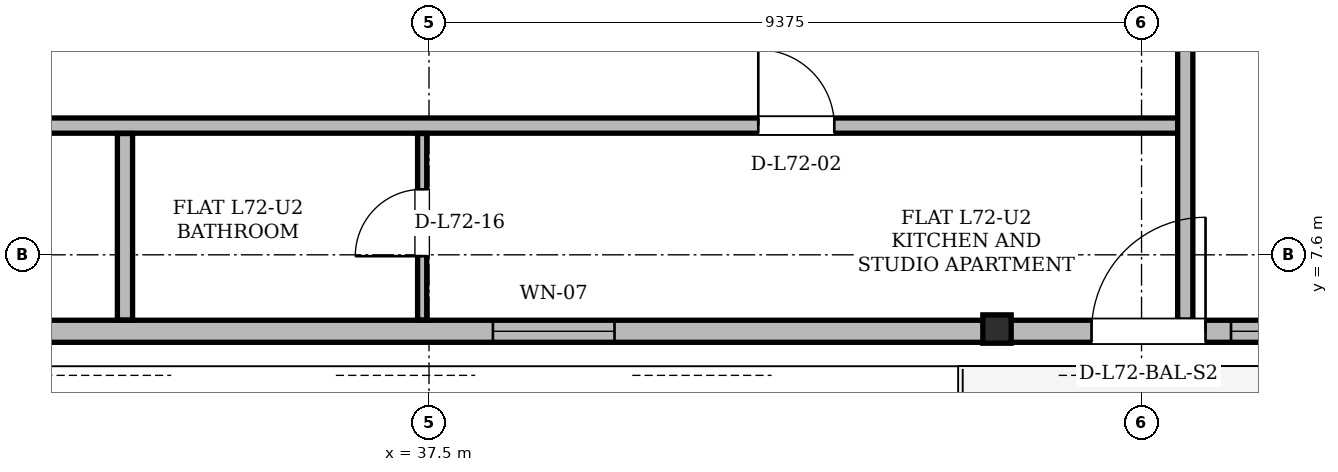
"""IFC4 building model, lengths in metres.
Left out: names, types, materials, properties, quantities, classifications, styles, units other than length and angle.
Written with IfcOpenShell. Run it as: python <this file> out.ifc"""

import sys

from ifc_helpers import new_model, si_unit, direction, frame, frame_2d, origin, origin_2d, place, context, subcontext, project, spatial, rectangle, i_section, extrude, element, fill, save


model = new_model("IFC4")
c1 = context("Model", 3, precision=1e-05, world=origin(), true_north=direction((0.0, 1.0)))
c2 = subcontext(c1, "Body", "Model", "MODEL_VIEW")
j1 = project(units=[si_unit("LENGTHUNIT", "METRE"), si_unit("PLANEANGLEUNIT", "RADIAN")], contexts=[c1])
p1 = place(None, origin())
s1 = spatial("IfcSite", under=j1, at=p1, CompositionType="ELEMENT")
p2 = place(p1, origin())
s2 = spatial("IfcBuilding", under=s1, at=p2, CompositionType="ELEMENT")
p3 = place(p2, frame((0.0, 0.0, 273.3)))
s3 = spatial("IfcBuildingStorey", under=s2, at=p3, CompositionType="ELEMENT", Elevation=273.3)
p4 = place(p3, frame((44.969, 6.594, 0.004), z_axis=(0.002383957357, 0.015182044222, 0.999881904167), x_axis=(-0.987895005451, 0.15512400912, 0.0)))
e1 = element("IfcColumn", 1, at=p4, inside=s3, PredefinedType="COLUMN", context=c2, shape_type="SweptSolid", body=[
    extrude(i_section(OverallWidth=0.373, OverallDepth=0.373, WebThickness=0.016, FlangeThickness=0.026, at=origin_2d()), origin(), (0.0, 0.0, 1.0), 3.892),
])
p5 = place(p3, frame((18.829, 6.594, 0.0), z_axis=(0.0, 0.0, 1.0), x_axis=(1.0, 0.0, 0.0)))
e2 = element("IfcWall", 2, at=p5, inside=s3, PredefinedType="SOLIDWALL", context=c2, shape_type="SweptSolid", body=[
    extrude(rectangle(XDim=37.343, YDim=0.29, at=frame_2d((18.671, 0.0))), origin(), (0.0, 0.0, 1.0), 3.058),
])
p6 = place(p5, frame((3.639, 0.0, 0.0)))
e3 = element("IfcOpeningElement", 3, at=p6, cuts=e2, PredefinedType="OPENING", context=c2, shape_type="SweptSolid", body=[
    extrude(rectangle(XDim=1.5, YDim=2.2, at=frame_2d((0.75, 1.1))), frame((0.0, 0.145, 0.0), z_axis=(0.0, -1.0, 0.0), x_axis=(1.0, 0.0, 0.0)), (0.0, 0.0, 1.0), 0.29),
])
p7 = place(p5, frame((27.388, 0.0, 0.0)))
e4 = element("IfcOpeningElement", 4, at=p7, cuts=e2, PredefinedType="OPENING", context=c2, shape_type="SweptSolid", body=[
    extrude(rectangle(XDim=1.5, YDim=2.2, at=frame_2d((0.75, 1.1))), frame((0.0, 0.145, 0.0), z_axis=(0.0, -1.0, 0.0), x_axis=(1.0, 0.0, 0.0)), (0.0, 0.0, 1.0), 0.29),
])
p8 = place(p5, frame((11.813, 0.0, 0.85)))
e5 = element("IfcOpeningElement", 5, at=p8, cuts=e2, PredefinedType="OPENING", context=c2, shape_type="SweptSolid", body=[
    extrude(rectangle(XDim=1.2, YDim=1.48, at=frame_2d((0.6, 0.74))), frame((0.0, 0.145, 0.0), z_axis=(0.0, -1.0, 0.0), x_axis=(1.0, 0.0, 0.0)), (0.0, 0.0, 1.0), 0.29),
])
p9 = place(p5, frame((0.897, 0.0, 0.85)))
e6 = element("IfcOpeningElement", 6, at=p9, cuts=e2, PredefinedType="OPENING", context=c2, shape_type="SweptSolid", body=[
    extrude(rectangle(XDim=1.2, YDim=1.48, at=frame_2d((0.6, 0.74))), frame((0.0, 0.145, 0.0), z_axis=(0.0, -1.0, 0.0), x_axis=(1.0, 0.0, 0.0)), (0.0, 0.0, 1.0), 0.29),
])
p10 = place(p5, frame((19.512, 0.0, 0.85)))
e7 = element("IfcOpeningElement", 7, at=p10, cuts=e2, PredefinedType="OPENING", context=c2, shape_type="SweptSolid", body=[
    extrude(rectangle(XDim=1.6, YDim=1.7, at=frame_2d((0.8, 0.85))), frame((0.0, 0.145, 0.0), z_axis=(0.0, -1.0, 0.0), x_axis=(1.0, 0.0, 0.0)), (0.0, 0.0, 1.0), 0.29),
])
p11 = place(p5, frame((29.224, 0.0, 0.85)))
e8 = element("IfcOpeningElement", 8, at=p11, cuts=e2, PredefinedType="OPENING", context=c2, shape_type="SweptSolid", body=[
    extrude(rectangle(XDim=1.2, YDim=1.48, at=frame_2d((0.6, 0.74))), frame((0.0, 0.145, 0.0), z_axis=(0.0, -1.0, 0.0), x_axis=(1.0, 0.0, 0.0)), (0.0, 0.0, 1.0), 0.29),
])
p12 = place(p5, frame((32.478, 0.0, 0.85)))
e9 = element("IfcOpeningElement", 9, at=p12, cuts=e2, PredefinedType="OPENING", context=c2, shape_type="SweptSolid", body=[
    extrude(rectangle(XDim=1.8, YDim=1.75, at=frame_2d((0.9, 0.875))), frame((0.0, 0.145, 0.0), z_axis=(0.0, -1.0, 0.0), x_axis=(1.0, 0.0, 0.0)), (0.0, 0.0, 1.0), 0.29),
])
p13 = place(p5, frame((35.23, 0.0, 0.85)))
e10 = element("IfcOpeningElement", 10, at=p13, cuts=e2, PredefinedType="OPENING", context=c2, shape_type="SweptSolid", body=[
    extrude(rectangle(XDim=1.2, YDim=1.48, at=frame_2d((0.6, 0.74))), frame((0.0, 0.145, 0.0), z_axis=(0.0, -1.0, 0.0), x_axis=(1.0, 0.0, 0.0)), (0.0, 0.0, 1.0), 0.29),
])
p14 = place(p3, frame((25.6, 9.3, 0.0), z_axis=(0.0, 0.0, 1.0), x_axis=(1.0, 0.0, 0.0)))
e11 = element("IfcWall", 11, at=p14, inside=s3, PredefinedType="PARTITIONING", context=c2, shape_type="SweptSolid", body=[
    extrude(rectangle(XDim=21.85, YDim=0.2, at=frame_2d((10.925, 0.0))), origin(), (0.0, 0.0, 1.0), 3.68),
])
p15 = place(p14, frame((3.841, 0.0, 0.0)))
e12 = element("IfcOpeningElement", 12, at=p15, cuts=e11, PredefinedType="OPENING", context=c2, shape_type="SweptSolid", body=[
    extrude(rectangle(XDim=1.0, YDim=2.18, at=frame_2d((0.5, 1.09))), frame((0.0, 0.1, 0.0), z_axis=(0.0, -1.0, 0.0), x_axis=(1.0, 0.0, 0.0)), (0.0, 0.0, 1.0), 0.2),
])
p16 = place(p14, frame((16.232, 0.0, 0.0)))
e13 = element("IfcOpeningElement", 13, at=p16, cuts=e11, PredefinedType="OPENING", context=c2, shape_type="SweptSolid", body=[
    extrude(rectangle(XDim=1.0, YDim=2.18, at=frame_2d((0.5, 1.09))), frame((0.0, 0.1, 0.0), z_axis=(0.0, -1.0, 0.0), x_axis=(1.0, 0.0, 0.0)), (0.0, 0.0, 1.0), 0.2),
])
p17 = place(p3, frame((33.5, 6.743, 0.0), z_axis=(0.0, 0.0, 1.0), x_axis=(0.0, 1.0, 0.0)))
e14 = element("IfcWall", 14, at=p17, inside=s3, PredefinedType="PARTITIONING", context=c2, shape_type="SweptSolid", body=[
    extrude(rectangle(XDim=2.453, YDim=0.2, at=frame_2d((1.227, 0.0))), origin(), (0.0, 0.0, 1.0), 3.68),
])
p18 = place(p3, frame((37.41, 6.743, 0.0), z_axis=(0.0, 0.0, 1.0), x_axis=(0.0, 1.0, 0.0)))
e15 = element("IfcWall", 15, at=p18, inside=s3, PredefinedType="PARTITIONING", context=c2, shape_type="SweptSolid", body=[
    extrude(rectangle(XDim=2.453, YDim=0.12, at=frame_2d((1.227, 0.0))), origin(), (0.0, 0.0, 1.0), 3.68),
])
p19 = place(p18, frame((0.839, 0.0, 0.0)))
e16 = element("IfcOpeningElement", 16, at=p19, cuts=e15, PredefinedType="OPENING", context=c2, shape_type="SweptSolid", body=[
    extrude(rectangle(XDim=0.88, YDim=2.08, at=frame_2d((0.44, 1.04))), frame((0.0, 0.06, 0.0), z_axis=(0.0, -1.0, 0.0), x_axis=(1.0, 0.0, 0.0)), (0.0, 0.0, 1.0), 0.12),
])
p20 = place(p3, frame((47.45, 6.743, 0.0), z_axis=(0.0, 0.0, 1.0), x_axis=(0.0, 1.0, 0.0)))
e17 = element("IfcWall", 17, at=p20, inside=s3, PredefinedType="PARTITIONING", context=c2, shape_type="SweptSolid", body=[
    extrude(rectangle(XDim=22.837, YDim=0.2, at=frame_2d((11.418, 0.0))), origin(), (0.0, 0.0, 1.0), 3.058),
])
p21 = place(p20, frame((7.153, 0.0, 0.0)))
e18 = element("IfcOpeningElement", 18, at=p21, cuts=e17, PredefinedType="OPENING", context=c2, shape_type="SweptSolid", body=[
    extrude(rectangle(XDim=1.0, YDim=2.18, at=frame_2d((0.5, 1.09))), frame((0.0, 0.1, 0.0), z_axis=(0.0, -1.0, 0.0), x_axis=(1.0, 0.0, 0.0)), (0.0, 0.0, 1.0), 0.2),
])
p22 = place(p20, frame((15.139, 0.0, 0.0)))
e19 = element("IfcOpeningElement", 19, at=p22, cuts=e17, PredefinedType="OPENING", context=c2, shape_type="SweptSolid", body=[
    extrude(rectangle(XDim=1.0, YDim=2.18, at=frame_2d((0.5, 1.09))), frame((0.0, 0.1, 0.0), z_axis=(0.0, -1.0, 0.0), x_axis=(1.0, 0.0, 0.0)), (0.0, 0.0, 1.0), 0.2),
])
p23 = place(p7, origin())
e20 = element("IfcDoor", 20, at=p23, inside=s3, OperationType="SINGLE_SWING_RIGHT", PredefinedType="DOOR", context=c2, shape_type="SweptSolid", body=[
    extrude(rectangle(XDim=1.5, YDim=2.2, at=frame_2d((0.75, 1.1))), frame((0.0, 0.025, 0.0), z_axis=(0.0, -1.0, 0.0), x_axis=(1.0, 0.0, 0.0)), (0.0, 0.0, 1.0), 0.05),
])
fill(e4, e20)
p24 = place(p10, origin())
e21 = element("IfcWindow", 21, at=p24, inside=s3, PartitioningType="SINGLE_PANEL", PredefinedType="WINDOW", context=c2, shape_type="SweptSolid", body=[
    extrude(rectangle(XDim=1.6, YDim=1.7, at=frame_2d((0.8, 0.85))), frame((0.0, 0.03, 0.0), z_axis=(0.0, -1.0, 0.0), x_axis=(1.0, 0.0, 0.0)), (0.0, 0.0, 1.0), 0.06),
])
fill(e7, e21)
p25 = place(p11, origin())
e22 = element("IfcWindow", 22, at=p25, inside=s3, PartitioningType="SINGLE_PANEL", PredefinedType="WINDOW", context=c2, shape_type="SweptSolid", body=[
    extrude(rectangle(XDim=1.2, YDim=1.48, at=frame_2d((0.6, 0.74))), frame((0.0, 0.03, 0.0), z_axis=(0.0, -1.0, 0.0), x_axis=(1.0, 0.0, 0.0)), (0.0, 0.0, 1.0), 0.06),
])
fill(e8, e22)
p26 = place(p16, origin())
e23 = element("IfcDoor", 23, at=p26, inside=s3, OperationType="SINGLE_SWING_LEFT", PredefinedType="DOOR", context=c2, shape_type="SweptSolid", body=[
    extrude(rectangle(XDim=1.0, YDim=2.18, at=frame_2d((0.5, 1.09))), frame((0.0, 0.025, 0.0), z_axis=(0.0, -1.0, 0.0), x_axis=(1.0, 0.0, 0.0)), (0.0, 0.0, 1.0), 0.05),
])
fill(e13, e23)
p27 = place(p19, origin())
e24 = element("IfcDoor", 24, at=p27, inside=s3, OperationType="SINGLE_SWING_LEFT", PredefinedType="DOOR", context=c2, shape_type="SweptSolid", body=[
    extrude(rectangle(XDim=0.88, YDim=2.08, at=frame_2d((0.44, 1.04))), frame((0.0, 0.025, 0.0), z_axis=(0.0, -1.0, 0.0), x_axis=(1.0, 0.0, 0.0)), (0.0, 0.0, 1.0), 0.05),
])
fill(e16, e24)
save(model, sys.argv[1])
